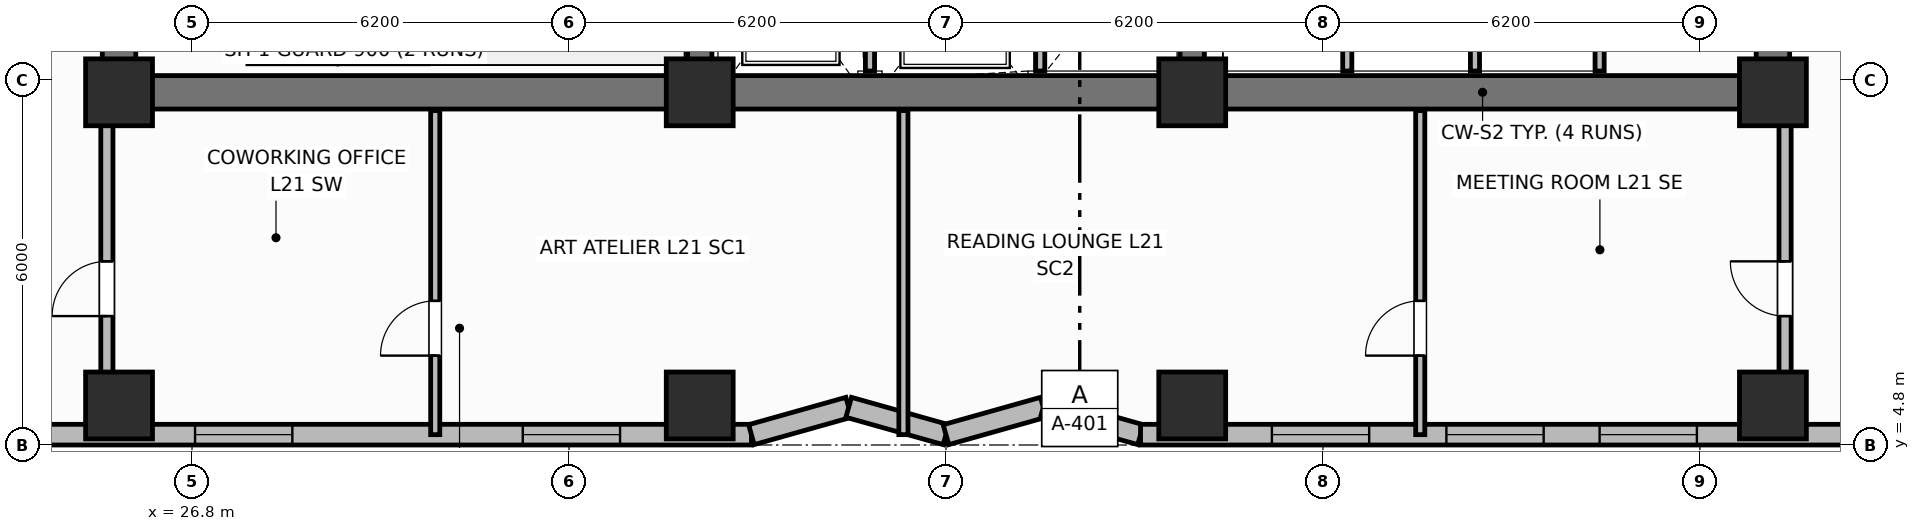
"""IFC4 building model, lengths in metres.
Left out: names, types, materials, properties, quantities, classifications, styles, units other than length and angle.
Written with IfcOpenShell. Run it as: python <this file> out.ifc"""

import sys

from ifc_helpers import new_model, si_unit, direction, frame, frame_2d, origin, origin_2d, place, context, subcontext, project, spatial, rectangle, extrude, element, fill, save


model = new_model("IFC4")
c1 = context("Model", 3, precision=1e-05, world=origin(), true_north=direction((0.0, 1.0)))
c2 = subcontext(c1, "Body", "Model", "MODEL_VIEW")
j1 = project(units=[si_unit("LENGTHUNIT", "METRE"), si_unit("PLANEANGLEUNIT", "RADIAN")], contexts=[c1])
p1 = place(None, origin())
s1 = spatial("IfcSite", under=j1, at=p1, CompositionType="ELEMENT")
p2 = place(p1, origin())
s2 = spatial("IfcBuilding", under=s1, at=p2, CompositionType="ELEMENT")
p3 = place(p2, frame((0.0, 0.0, 88.3)))
s3 = spatial("IfcBuildingStorey", under=s2, at=p3, CompositionType="ELEMENT", Elevation=88.3)
p4 = place(p3, frame((52.8, 10.6, 0.0), z_axis=(0.0, 0.0, 1.0), x_axis=(-1.0, 0.0, 0.0)))
e1 = element("IfcWall", 1, at=p4, inside=s3, PredefinedType="SHEAR", context=c2, shape_type="SweptSolid", body=[
    extrude(rectangle(XDim=27.2, YDim=0.55, at=frame_2d((13.6, 0.0))), origin(), (0.0, 0.0, 1.0), 3.7),
])
for number, where, z_axis, x_axis in (
    (2, (25.6, 10.875, 0.0), (0.0, 0.0, 1.0), (0.0, 1.0, 0.0)),
    (3, (52.8, 10.875, 0.0), (0.0, 0.0, 1.0), (0.0, 1.0, 0.0)),
):
    element("IfcWall", number, at=place(p3, frame(where, z_axis=z_axis, x_axis=x_axis)), inside=s3, PredefinedType="SHEAR", context=c2, shape_type="SweptSolid", body=[
        extrude(rectangle(XDim=5.65, YDim=0.55, at=frame_2d((2.825, 0.0))), origin(), (0.0, 0.0, 1.0), 3.7),
    ])
for number, where, z_axis, x_axis in (
    (4, (35.15, 10.875, 0.0), (0.0, 0.0, 1.0), (0.0, 1.0, 0.0)),
    (5, (43.25, 10.875, 0.0), (0.0, 0.0, 1.0), (0.0, 1.0, 0.0)),
):
    element("IfcWall", number, at=place(p3, frame(where, z_axis=z_axis, x_axis=x_axis)), inside=s3, PredefinedType="SHEAR", context=c2, shape_type="SweptSolid", body=[
        extrude(rectangle(XDim=5.65, YDim=0.4, at=frame_2d((2.825, 0.0))), origin(), (0.0, 0.0, 1.0), 3.7),
    ])
for number, where, z_axis, x_axis in (
    (6, (25.6, 10.6, 0.0), (0.0, 0.0, 1.0), (1.0, 0.0, 0.0)),
    (7, (35.15, 10.6, 0.0), (0.0, 0.0, 1.0), (1.0, 0.0, 0.0)),
    (8, (43.25, 10.6, 0.0), (0.0, 0.0, 1.0), (1.0, 0.0, 0.0)),
    (9, (52.8, 10.6, 0.0), (0.0, 0.0, 1.0), (1.0, 0.0, 0.0)),
    (10, (25.6, 5.45, 0.0), (0.0, 0.0, 1.0), (1.0, 0.0, 0.0)),
    (11, (35.15, 5.45, 0.0), (0.0, 0.0, 1.0), (1.0, 0.0, 0.0)),
    (12, (43.25, 5.45, 0.0), (0.0, 0.0, 1.0), (1.0, 0.0, 0.0)),
    (13, (52.8, 5.45, 0.0), (0.0, 0.0, 1.0), (1.0, 0.0, 0.0)),
):
    element("IfcColumn", number, at=place(p3, frame(where, z_axis=z_axis, x_axis=x_axis)), inside=s3, PredefinedType="COLUMN", context=c2, shape_type="SweptSolid", body=[
        extrude(rectangle(XDim=1.1, YDim=1.1, at=origin_2d()), origin(), (0.0, 0.0, 1.0), 3.7),
    ])
p5 = place(p3, frame((18.6, 4.97, 0.0), z_axis=(0.0, 0.0, 1.0), x_axis=(1.0, 0.0, 0.0)))
e14 = element("IfcWall", 14, at=p5, inside=s3, PredefinedType="SOLIDWALL", context=c2, shape_type="SweptSolid", body=[
    extrude(rectangle(XDim=17.4, YDim=0.34, at=frame_2d((8.7, 0.0))), origin(), (0.0, 0.0, 1.0), 2.7),
])
p6 = place(p5, frame((1.46, 0.0, 0.68)))
e15 = element("IfcOpeningElement", 15, at=p6, cuts=e14, PredefinedType="OPENING", context=c2, shape_type="SweptSolid", body=[
    extrude(rectangle(XDim=1.6, YDim=1.9, at=frame_2d((0.8, 0.95))), frame((0.0, 0.18, 0.0), z_axis=(0.0, -1.0, 0.0), x_axis=(1.0, 0.0, 0.0)), (0.0, 0.0, 1.0), 0.36),
])
p7 = place(p5, frame((8.25, 0.0, 0.68)))
e16 = element("IfcOpeningElement", 16, at=p7, cuts=e14, PredefinedType="OPENING", context=c2, shape_type="SweptSolid", body=[
    extrude(rectangle(XDim=1.6, YDim=1.9, at=frame_2d((0.8, 0.95))), frame((0.0, 0.18, 0.0), z_axis=(0.0, -1.0, 0.0), x_axis=(1.0, 0.0, 0.0)), (0.0, 0.0, 1.0), 0.36),
])
p8 = place(p5, frame((13.64, 0.0, 0.68)))
e17 = element("IfcOpeningElement", 17, at=p8, cuts=e14, PredefinedType="OPENING", context=c2, shape_type="SweptSolid", body=[
    extrude(rectangle(XDim=1.6, YDim=1.9, at=frame_2d((0.8, 0.95))), frame((0.0, 0.18, 0.0), z_axis=(0.0, -1.0, 0.0), x_axis=(1.0, 0.0, 0.0)), (0.0, 0.0, 1.0), 0.36),
])
p9 = place(p3, frame((36.0, 4.97, 0.0), z_axis=(0.0, 0.0, 1.0), x_axis=(0.962662902433, 0.270703040766, 0.0)))
e18 = element("IfcWall", 18, at=p9, inside=s3, PredefinedType="SOLIDWALL", context=c2, shape_type="SweptSolid", body=[
    extrude(rectangle(XDim=1.662, YDim=0.34, at=frame_2d((0.831, 0.0))), origin(), (0.0, 0.0, 1.0), 2.7),
])
p10 = place(p3, frame((37.6, 5.42, 0.0), z_axis=(0.0, 0.0, 1.0), x_axis=(0.962652136636, -0.270741322725, 0.0)))
e19 = element("IfcWall", 19, at=p10, inside=s3, PredefinedType="SOLIDWALL", context=c2, shape_type="SweptSolid", body=[
    extrude(rectangle(XDim=1.662, YDim=0.34, at=frame_2d((0.831, 0.0))), origin(), (0.0, 0.0, 1.0), 2.7),
])
p11 = place(p3, frame((39.2, 4.97, 0.0), z_axis=(0.0, 0.0, 1.0), x_axis=(0.962662902433, 0.270703040766, 0.0)))
e20 = element("IfcWall", 20, at=p11, inside=s3, PredefinedType="SOLIDWALL", context=c2, shape_type="SweptSolid", body=[
    extrude(rectangle(XDim=1.662, YDim=0.34, at=frame_2d((0.831, 0.0))), origin(), (0.0, 0.0, 1.0), 2.7),
])
p12 = place(p3, frame((40.8, 5.42, 0.0), z_axis=(0.0, 0.0, 1.0), x_axis=(0.962652136636, -0.270741322725, 0.0)))
e21 = element("IfcWall", 21, at=p12, inside=s3, PredefinedType="SOLIDWALL", context=c2, shape_type="SweptSolid", body=[
    extrude(rectangle(XDim=1.662, YDim=0.34, at=frame_2d((0.831, 0.0))), origin(), (0.0, 0.0, 1.0), 2.7),
])
p13 = place(p3, frame((42.4, 4.97, 0.0), z_axis=(0.0, 0.0, 1.0), x_axis=(1.0, 0.0, 0.0)))
e22 = element("IfcWall", 22, at=p13, inside=s3, PredefinedType="SOLIDWALL", context=c2, shape_type="SweptSolid", body=[
    extrude(rectangle(XDim=17.4, YDim=0.34, at=frame_2d((8.7, 0.0))), origin(), (0.0, 0.0, 1.0), 2.7),
])
p14 = place(p13, frame((2.16, 0.0, 0.68)))
e23 = element("IfcOpeningElement", 23, at=p14, cuts=e22, PredefinedType="OPENING", context=c2, shape_type="SweptSolid", body=[
    extrude(rectangle(XDim=1.6, YDim=1.9, at=frame_2d((0.8, 0.95))), frame((0.0, 0.18, 0.0), z_axis=(0.0, -1.0, 0.0), x_axis=(1.0, 0.0, 0.0)), (0.0, 0.0, 1.0), 0.36),
])
p15 = place(p13, frame((5.03, 0.0, 0.68)))
e24 = element("IfcOpeningElement", 24, at=p15, cuts=e22, PredefinedType="OPENING", context=c2, shape_type="SweptSolid", body=[
    extrude(rectangle(XDim=1.6, YDim=1.9, at=frame_2d((0.8, 0.95))), frame((0.0, 0.18, 0.0), z_axis=(0.0, -1.0, 0.0), x_axis=(1.0, 0.0, 0.0)), (0.0, 0.0, 1.0), 0.36),
])
p16 = place(p13, frame((7.55, 0.0, 0.68)))
e25 = element("IfcOpeningElement", 25, at=p16, cuts=e22, PredefinedType="OPENING", context=c2, shape_type="SweptSolid", body=[
    extrude(rectangle(XDim=1.6, YDim=1.9, at=frame_2d((0.8, 0.95))), frame((0.0, 0.18, 0.0), z_axis=(0.0, -1.0, 0.0), x_axis=(1.0, 0.0, 0.0)), (0.0, 0.0, 1.0), 0.36),
])
p17 = place(p13, frame((14.34, 0.0, 0.68)))
e26 = element("IfcOpeningElement", 26, at=p17, cuts=e22, PredefinedType="OPENING", context=c2, shape_type="SweptSolid", body=[
    extrude(rectangle(XDim=1.6, YDim=1.9, at=frame_2d((0.8, 0.95))), frame((0.0, 0.18, 0.0), z_axis=(0.0, -1.0, 0.0), x_axis=(1.0, 0.0, 0.0)), (0.0, 0.0, 1.0), 0.36),
])
for number, where, z_axis, x_axis in (
    (27, (37.95, 10.95, 0.0), (0.0, 0.0, 1.0), (0.0, 1.0, 0.0)),
    (28, (40.75, 10.95, 0.0), (0.0, 0.0, 1.0), (0.0, 1.0, 0.0)),
):
    element("IfcWall", number, at=place(p3, frame(where, z_axis=z_axis, x_axis=x_axis)), inside=s3, PredefinedType="PARTITIONING", context=c2, shape_type="SweptSolid", body=[
        extrude(rectangle(XDim=2.75, YDim=0.15, at=frame_2d((1.375, 0.0))), origin(), (0.0, 0.0, 1.0), 2.53),
    ])
for number, where, z_axis, x_axis in (
    (29, (45.8, 10.95, 0.0), (0.0, 0.0, 1.0), (0.0, 1.0, 0.0)),
    (30, (47.9, 10.95, 0.0), (0.0, 0.0, 1.0), (0.0, 1.0, 0.0)),
    (31, (49.95, 10.95, 0.0), (0.0, 0.0, 1.0), (0.0, 1.0, 0.0)),
):
    element("IfcWall", number, at=place(p3, frame(where, z_axis=z_axis, x_axis=x_axis)), inside=s3, PredefinedType="PARTITIONING", context=c2, shape_type="SweptSolid", body=[
        extrude(rectangle(XDim=2.7, YDim=0.15, at=frame_2d((1.35, 0.0))), origin(), (0.0, 0.0, 1.0), 2.53),
    ])
p18 = place(p3, frame((30.8, 4.97, 0.0), z_axis=(0.0, 0.0, 1.0), x_axis=(0.0, 1.0, 0.0)))
e32 = element("IfcWall", 32, at=p18, inside=s3, PredefinedType="PARTITIONING", context=c2, shape_type="SweptSolid", body=[
    extrude(rectangle(XDim=5.33, YDim=0.15, at=frame_2d((2.665, 0.0))), origin(), (0.0, 0.0, 1.0), 2.53),
])
p19 = place(p18, frame((1.3, 0.0, 0.0)))
e33 = element("IfcOpeningElement", 33, at=p19, cuts=e32, PredefinedType="OPENING", context=c2, shape_type="SweptSolid", body=[
    extrude(rectangle(XDim=0.9, YDim=2.1, at=frame_2d((0.45, 1.05))), frame((0.0, 0.085, 0.0), z_axis=(0.0, -1.0, 0.0), x_axis=(1.0, 0.0, 0.0)), (0.0, 0.0, 1.0), 0.17),
])
p20 = place(p3, frame((38.5, 4.97, 0.0), z_axis=(0.0, 0.0, 1.0), x_axis=(0.0, 1.0, 0.0)))
e34 = element("IfcWall", 34, at=p20, inside=s3, PredefinedType="PARTITIONING", context=c2, shape_type="SweptSolid", body=[
    extrude(rectangle(XDim=5.33, YDim=0.15, at=frame_2d((2.665, 0.0))), origin(), (0.0, 0.0, 1.0), 2.53),
])
p21 = place(p3, frame((47.0, 4.97, 0.0), z_axis=(0.0, 0.0, 1.0), x_axis=(0.0, 1.0, 0.0)))
e35 = element("IfcWall", 35, at=p21, inside=s3, PredefinedType="PARTITIONING", context=c2, shape_type="SweptSolid", body=[
    extrude(rectangle(XDim=5.33, YDim=0.15, at=frame_2d((2.665, 0.0))), origin(), (0.0, 0.0, 1.0), 2.53),
])
p22 = place(p21, frame((1.3, 0.0, 0.0)))
e36 = element("IfcOpeningElement", 36, at=p22, cuts=e35, PredefinedType="OPENING", context=c2, shape_type="SweptSolid", body=[
    extrude(rectangle(XDim=0.9, YDim=2.1, at=frame_2d((0.45, 1.05))), frame((0.0, 0.085, 0.0), z_axis=(0.0, -1.0, 0.0), x_axis=(1.0, 0.0, 0.0)), (0.0, 0.0, 1.0), 0.17),
])
p23 = place(p3, frame((25.4, 5.62, 0.0), z_axis=(0.0, 0.0, 1.0), x_axis=(0.0, 1.0, 0.0)))
e37 = element("IfcWall", 37, at=p23, inside=s3, PredefinedType="PARTITIONING", context=c2, shape_type="SweptSolid", body=[
    extrude(rectangle(XDim=4.68, YDim=0.2, at=frame_2d((2.34, 0.0))), origin(), (0.0, 0.0, 1.0), 2.53),
])
p24 = place(p23, frame((1.3, 0.0, 0.0)))
e38 = element("IfcOpeningElement", 38, at=p24, cuts=e37, PredefinedType="OPENING", context=c2, shape_type="SweptSolid", body=[
    extrude(rectangle(XDim=0.9, YDim=2.1, at=frame_2d((0.45, 1.05))), frame((0.0, 0.11, 0.0), z_axis=(0.0, -1.0, 0.0), x_axis=(1.0, 0.0, 0.0)), (0.0, 0.0, 1.0), 0.22),
])
p25 = place(p3, frame((53.0, 5.62, 0.0), z_axis=(0.0, 0.0, 1.0), x_axis=(0.0, 1.0, 0.0)))
e39 = element("IfcWall", 39, at=p25, inside=s3, PredefinedType="PARTITIONING", context=c2, shape_type="SweptSolid", body=[
    extrude(rectangle(XDim=4.68, YDim=0.2, at=frame_2d((2.34, 0.0))), origin(), (0.0, 0.0, 1.0), 2.53),
])
p26 = place(p25, frame((1.3, 0.0, 0.0)))
e40 = element("IfcOpeningElement", 40, at=p26, cuts=e39, PredefinedType="OPENING", context=c2, shape_type="SweptSolid", body=[
    extrude(rectangle(XDim=0.9, YDim=2.1, at=frame_2d((0.45, 1.05))), frame((0.0, 0.11, 0.0), z_axis=(0.0, -1.0, 0.0), x_axis=(1.0, 0.0, 0.0)), (0.0, 0.0, 1.0), 0.22),
])
p27 = place(p7, origin())
e41 = element("IfcWindow", 41, at=p27, inside=s3, PartitioningType="SINGLE_PANEL", PredefinedType="WINDOW", context=c2, shape_type="SweptSolid", body=[
    extrude(rectangle(XDim=1.6, YDim=1.9, at=frame_2d((0.8, 0.95))), frame((0.0, 0.03, 0.0), z_axis=(0.0, -1.0, 0.0), x_axis=(1.0, 0.0, 0.0)), (0.0, 0.0, 1.0), 0.06),
])
fill(e16, e41)
p28 = place(p8, origin())
e42 = element("IfcWindow", 42, at=p28, inside=s3, PartitioningType="SINGLE_PANEL", PredefinedType="WINDOW", context=c2, shape_type="SweptSolid", body=[
    extrude(rectangle(XDim=1.6, YDim=1.9, at=frame_2d((0.8, 0.95))), frame((0.0, 0.03, 0.0), z_axis=(0.0, -1.0, 0.0), x_axis=(1.0, 0.0, 0.0)), (0.0, 0.0, 1.0), 0.06),
])
fill(e17, e42)
p29 = place(p14, origin())
e43 = element("IfcWindow", 43, at=p29, inside=s3, PartitioningType="SINGLE_PANEL", PredefinedType="WINDOW", context=c2, shape_type="SweptSolid", body=[
    extrude(rectangle(XDim=1.6, YDim=1.9, at=frame_2d((0.8, 0.95))), frame((0.0, 0.03, 0.0), z_axis=(0.0, -1.0, 0.0), x_axis=(1.0, 0.0, 0.0)), (0.0, 0.0, 1.0), 0.06),
])
fill(e23, e43)
p30 = place(p15, origin())
e44 = element("IfcWindow", 44, at=p30, inside=s3, PartitioningType="SINGLE_PANEL", PredefinedType="WINDOW", context=c2, shape_type="SweptSolid", body=[
    extrude(rectangle(XDim=1.6, YDim=1.9, at=frame_2d((0.8, 0.95))), frame((0.0, 0.03, 0.0), z_axis=(0.0, -1.0, 0.0), x_axis=(1.0, 0.0, 0.0)), (0.0, 0.0, 1.0), 0.06),
])
fill(e24, e44)
p31 = place(p16, origin())
e45 = element("IfcWindow", 45, at=p31, inside=s3, PartitioningType="SINGLE_PANEL", PredefinedType="WINDOW", context=c2, shape_type="SweptSolid", body=[
    extrude(rectangle(XDim=1.6, YDim=1.9, at=frame_2d((0.8, 0.95))), frame((0.0, 0.03, 0.0), z_axis=(0.0, -1.0, 0.0), x_axis=(1.0, 0.0, 0.0)), (0.0, 0.0, 1.0), 0.06),
])
fill(e25, e45)
p32 = place(p19, origin())
e46 = element("IfcDoor", 46, at=p32, inside=s3, OperationType="SINGLE_SWING_LEFT", PredefinedType="DOOR", context=c2, shape_type="SweptSolid", body=[
    extrude(rectangle(XDim=0.9, YDim=2.1, at=frame_2d((0.45, 1.05))), frame((0.0, 0.025, 0.0), z_axis=(0.0, -1.0, 0.0), x_axis=(1.0, 0.0, 0.0)), (0.0, 0.0, 1.0), 0.05),
])
fill(e33, e46)
p33 = place(p22, origin())
e47 = element("IfcDoor", 47, at=p33, inside=s3, OperationType="SINGLE_SWING_LEFT", PredefinedType="DOOR", context=c2, shape_type="SweptSolid", body=[
    extrude(rectangle(XDim=0.9, YDim=2.1, at=frame_2d((0.45, 1.05))), frame((0.0, 0.025, 0.0), z_axis=(0.0, -1.0, 0.0), x_axis=(1.0, 0.0, 0.0)), (0.0, 0.0, 1.0), 0.05),
])
fill(e36, e47)
p34 = place(p24, origin())
e48 = element("IfcDoor", 48, at=p34, inside=s3, OperationType="SINGLE_SWING_LEFT", PredefinedType="DOOR", context=c2, shape_type="SweptSolid", body=[
    extrude(rectangle(XDim=0.9, YDim=2.1, at=frame_2d((0.45, 1.05))), frame((0.0, 0.025, 0.0), z_axis=(0.0, -1.0, 0.0), x_axis=(1.0, 0.0, 0.0)), (0.0, 0.0, 1.0), 0.05),
])
fill(e38, e48)
p35 = place(p26, origin())
e49 = element("IfcDoor", 49, at=p35, inside=s3, OperationType="SINGLE_SWING_RIGHT", PredefinedType="DOOR", context=c2, shape_type="SweptSolid", body=[
    extrude(rectangle(XDim=0.9, YDim=2.1, at=frame_2d((0.45, 1.05))), frame((0.0, 0.025, 0.0), z_axis=(0.0, -1.0, 0.0), x_axis=(1.0, 0.0, 0.0)), (0.0, 0.0, 1.0), 0.05),
])
fill(e40, e49)
save(model, sys.argv[1])
